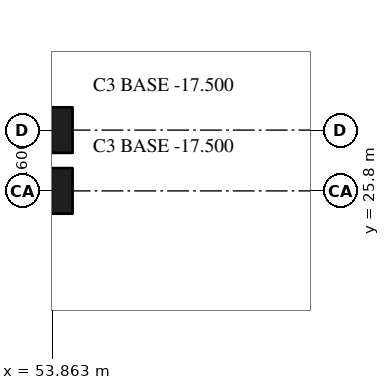
"""IFC4 building model, lengths in metres.
Left out: names, types, materials, properties, quantities, classifications, styles, units other than length and angle.
Written with IfcOpenShell. Run it as: python <this file> out.ifc"""

import sys

from ifc_helpers import new_model, si_unit, direction, frame, origin, origin_2d, place, context, subcontext, project, spatial, rectangle, extrude, element, save


model = new_model("IFC4")
c1 = context("Model", 3, precision=1e-05, world=origin(), true_north=direction((0.0, 1.0)))
c2 = subcontext(c1, "Body", "Model", "MODEL_VIEW")
j1 = project(units=[si_unit("LENGTHUNIT", "METRE"), si_unit("PLANEANGLEUNIT", "RADIAN")], contexts=[c1])
p1 = place(None, origin())
s1 = spatial("IfcSite", under=j1, at=p1, CompositionType="ELEMENT")
p2 = place(p1, origin())
s2 = spatial("IfcBuilding", under=s1, at=p2, CompositionType="ELEMENT")
p3 = place(p2, frame((0.0, 0.0, -17.0)))
s3 = spatial("IfcBuildingStorey", under=s2, at=p3, CompositionType="ELEMENT", Elevation=-17.0)
for number, where, z_axis, x_axis in (
    (1, (53.8, 25.8, -0.5), (0.0, 0.0, 1.0), (1.0, 0.0, 0.0)),
    (2, (53.8, 27.4, -0.5), (0.0, 0.0, 1.0), (1.0, 0.0, 0.0)),
):
    element("IfcColumn", number, at=place(p3, frame(where, z_axis=z_axis, x_axis=x_axis)), inside=s3, PredefinedType="COLUMN", context=c2, shape_type="SweptSolid", body=[
        extrude(rectangle(XDim=1.2, YDim=1.2, at=origin_2d()), origin(), (0.0, 0.0, 1.0), 5.5),
    ])
save(model, sys.argv[1])
